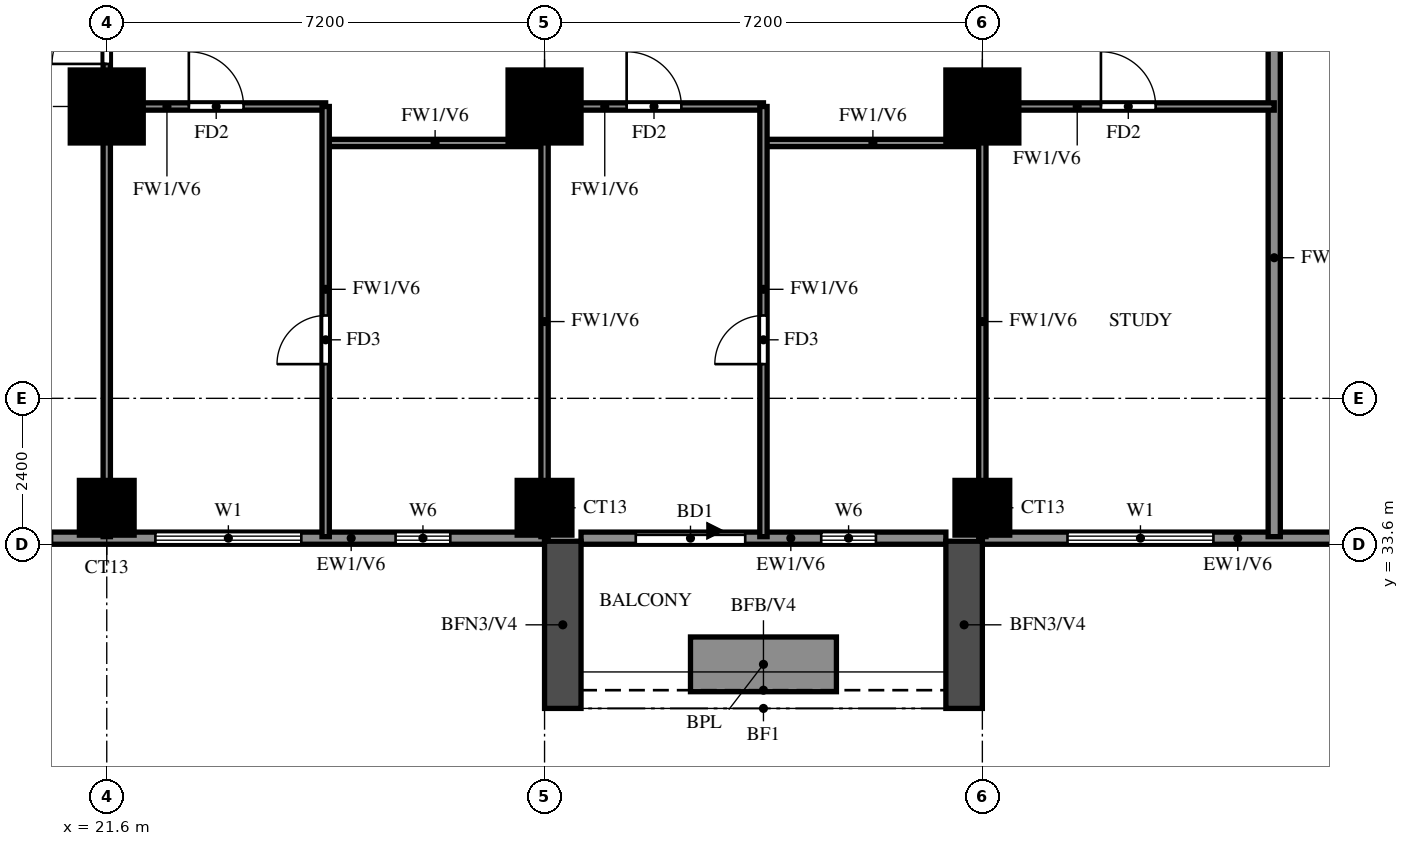
"""IFC4 building model, lengths in metres.
Left out: names, types, materials, properties, quantities, classifications, styles, units other than length and angle.
Written with IfcOpenShell. Run it as: python <this file> out.ifc"""

import sys

from ifc_helpers import new_model, si_unit, direction, frame, frame_2d, origin, origin_2d, place, context, subcontext, project, spatial, rectangle, extrude, source, transform, mapped, element, fill, save


model = new_model("IFC4")
c1 = context("Model", 3, precision=1e-05, world=origin(), true_north=direction((0.0, 1.0)))
c2 = subcontext(c1, "Body", "Model", "MODEL_VIEW")
j1 = project(units=[si_unit("LENGTHUNIT", "METRE"), si_unit("PLANEANGLEUNIT", "RADIAN")], contexts=[c1])
p1 = place(None, origin())
s1 = spatial("IfcSite", under=j1, at=p1, CompositionType="ELEMENT")
p2 = place(p1, origin())
s2 = spatial("IfcBuilding", under=s1, at=p2, CompositionType="ELEMENT")
p3 = place(p2, frame((0.0, 0.0, 104.0)))
s3 = spatial("IfcBuildingStorey", under=s2, at=p3, CompositionType="ELEMENT", Elevation=104.0)
m1 = source(origin(), c2, "Body", "SweptSolid", [
    extrude(rectangle(XDim=0.9, YDim=0.9, at=origin_2d()), origin(), (0.0, 0.0, 1.0), 3.1),
])
for number, where, z_axis, x_axis in (
    (1, (21.6, 34.2, 0.0), (0.0, 0.0, 1.0), (1.0, 0.0, 0.0)),
    (2, (28.8, 34.2, 0.0), (0.0, 0.0, 1.0), (1.0, 0.0, 0.0)),
    (3, (36.0, 34.2, 0.0), (0.0, 0.0, 1.0), (1.0, 0.0, 0.0)),
):
    element("IfcColumn", number, at=place(p3, frame(where, z_axis=z_axis, x_axis=x_axis)), inside=s3, PredefinedType="COLUMN", context=c2, shape_type="MappedRepresentation", body=[
        mapped(m1, transform((0.0, 0.0, 0.0))),
    ])
m2 = source(origin(), c2, "Body", "SweptSolid", [
    extrude(rectangle(XDim=1.2, YDim=1.2, at=origin_2d()), origin(), (0.0, 0.0, 1.0), 3.1),
])
for number, where, z_axis, x_axis in (
    (4, (21.6, 40.8, 0.0), (0.0, 0.0, 1.0), (1.0, 0.0, 0.0)),
    (5, (28.8, 40.8, 0.0), (0.0, 0.0, 1.0), (1.0, 0.0, 0.0)),
    (6, (36.0, 40.8, 0.0), (0.0, 0.0, 1.0), (1.0, 0.0, 0.0)),
):
    element("IfcColumn", number, at=place(p3, frame(where, z_axis=z_axis, x_axis=x_axis)), inside=s3, PredefinedType="COLUMN", context=c2, shape_type="MappedRepresentation", body=[
        mapped(m2, transform((0.0, 0.0, 0.0))),
    ])
p4 = place(p3, frame((18.2, 33.7, 0.0), z_axis=(0.0, 0.0, 1.0), x_axis=(1.0, 0.0, 0.0)))
e7 = element("IfcWall", 7, at=p4, inside=s3, PredefinedType="SOLIDWALL", context=c2, shape_type="SweptSolid", body=[
    extrude(rectangle(XDim=10.6, YDim=0.2, at=frame_2d((5.3, 0.0))), origin(), (0.0, 0.0, 1.0), 3.1),
])
p5 = place(p4, frame((0.7, 0.0, 0.6)))
e8 = element("IfcOpeningElement", 8, at=p5, cuts=e7, PredefinedType="OPENING", context=c2, shape_type="SweptSolid", body=[
    extrude(rectangle(XDim=1.8, YDim=2.4, at=frame_2d((0.9, 1.2))), frame((0.0, 0.11, 0.0), z_axis=(0.0, -1.0, 0.0), x_axis=(1.0, 0.0, 0.0)), (0.0, 0.0, 1.0), 0.22),
])
p6 = place(p4, frame((4.2, 0.0, 0.6)))
e9 = element("IfcOpeningElement", 9, at=p6, cuts=e7, PredefinedType="OPENING", context=c2, shape_type="SweptSolid", body=[
    extrude(rectangle(XDim=2.4, YDim=2.4, at=frame_2d((1.2, 1.2))), frame((0.0, 0.11, 0.0), z_axis=(0.0, -1.0, 0.0), x_axis=(1.0, 0.0, 0.0)), (0.0, 0.0, 1.0), 0.22),
])
p7 = place(p4, frame((8.15, 0.0, 1.5)))
e10 = element("IfcOpeningElement", 10, at=p7, cuts=e7, PredefinedType="OPENING", context=c2, shape_type="SweptSolid", body=[
    extrude(rectangle(XDim=0.9, YDim=0.9, at=frame_2d((0.45, 0.45))), frame((0.0, 0.11, 0.0), z_axis=(0.0, -1.0, 0.0), x_axis=(1.0, 0.0, 0.0)), (0.0, 0.0, 1.0), 0.22),
])
p8 = place(p3, frame((29.4, 33.7, 0.0), z_axis=(0.0, 0.0, 1.0), x_axis=(1.0, 0.0, 0.0)))
e11 = element("IfcWall", 11, at=p8, inside=s3, PredefinedType="SOLIDWALL", context=c2, shape_type="SweptSolid", body=[
    extrude(rectangle(XDim=6.0, YDim=0.2, at=frame_2d((3.0, 0.0))), origin(), (0.0, 0.0, 1.0), 3.1),
])
p9 = place(p8, frame((0.9, 0.0, 0.0)))
e12 = element("IfcOpeningElement", 12, at=p9, cuts=e11, PredefinedType="OPENING", context=c2, shape_type="SweptSolid", body=[
    extrude(rectangle(XDim=1.8, YDim=2.4, at=frame_2d((0.9, 1.2))), frame((0.0, 0.11, 0.0), z_axis=(0.0, -1.0, 0.0), x_axis=(1.0, 0.0, 0.0)), (0.0, 0.0, 1.0), 0.22),
])
p10 = place(p8, frame((3.95, 0.0, 1.5)))
e13 = element("IfcOpeningElement", 13, at=p10, cuts=e11, PredefinedType="OPENING", context=c2, shape_type="SweptSolid", body=[
    extrude(rectangle(XDim=0.9, YDim=0.9, at=frame_2d((0.45, 0.45))), frame((0.0, 0.11, 0.0), z_axis=(0.0, -1.0, 0.0), x_axis=(1.0, 0.0, 0.0)), (0.0, 0.0, 1.0), 0.22),
])
p11 = place(p3, frame((36.0, 33.7, 0.0), z_axis=(0.0, 0.0, 1.0), x_axis=(1.0, 0.0, 0.0)))
e14 = element("IfcWall", 14, at=p11, inside=s3, PredefinedType="SOLIDWALL", context=c2, shape_type="SweptSolid", body=[
    extrude(rectangle(XDim=6.0, YDim=0.2, at=frame_2d((3.0, 0.0))), origin(), (0.0, 0.0, 1.0), 3.1),
])
p12 = place(p11, frame((1.4, 0.0, 0.6)))
e15 = element("IfcOpeningElement", 15, at=p12, cuts=e14, PredefinedType="OPENING", context=c2, shape_type="SweptSolid", body=[
    extrude(rectangle(XDim=2.4, YDim=2.4, at=frame_2d((1.2, 1.2))), frame((0.0, 0.11, 0.0), z_axis=(0.0, -1.0, 0.0), x_axis=(1.0, 0.0, 0.0)), (0.0, 0.0, 1.0), 0.22),
])
for number, where, z_axis, x_axis in (
    (16, (29.1, 33.65, 0.0), (0.0, 0.0, 1.0), (0.0, -1.0, 0.0)),
    (17, (35.7, 33.65, 0.0), (0.0, 0.0, 1.0), (0.0, -1.0, 0.0)),
):
    element("IfcWall", number, at=place(p3, frame(where, z_axis=z_axis, x_axis=x_axis)), inside=s3, PredefinedType="SOLIDWALL", context=c2, shape_type="SweptSolid", body=[
        extrude(rectangle(XDim=2.75, YDim=0.6, at=frame_2d((1.375, 0.0))), origin(), (0.0, 0.0, 1.0), 2.77),
    ])
p13 = place(p3, frame((31.2, 31.625, 0.0), z_axis=(0.0, 0.0, 1.0), x_axis=(1.0, 0.0, 0.0)))
e18 = element("IfcWall", 18, at=p13, inside=s3, PredefinedType="SOLIDWALL", context=c2, shape_type="SweptSolid", body=[
    extrude(rectangle(XDim=2.4, YDim=0.9, at=frame_2d((1.2, 0.0))), origin(), (0.0, 0.0, 1.0), 0.9),
])
p14 = place(p3, frame((40.8, 33.725, 0.0), z_axis=(0.0, 0.0, 1.0), x_axis=(0.0, 1.0, 0.0)))
e19 = element("IfcWall", 19, at=p14, inside=s3, PredefinedType="SOLIDWALL", context=c2, shape_type="SweptSolid", body=[
    extrude(rectangle(XDim=9.175, YDim=0.2, at=frame_2d((4.587, 0.0))), origin(), (0.0, 0.0, 1.0), 3.1),
])
for number, where, z_axis, x_axis in (
    (20, (25.2, 40.2, 0.0), (0.0, 0.0, 1.0), (1.0, 0.0, 0.0)),
    (21, (32.4, 40.2, 0.0), (0.0, 0.0, 1.0), (1.0, 0.0, 0.0)),
):
    element("IfcWall", number, at=place(p3, frame(where, z_axis=z_axis, x_axis=x_axis)), inside=s3, PredefinedType="PARTITIONING", context=c2, shape_type="SweptSolid", body=[
        extrude(rectangle(XDim=3.6, YDim=0.12, at=frame_2d((1.8, 0.0))), origin(), (0.0, 0.0, 1.0), 3.1),
    ])
p15 = place(p3, frame((21.6, 40.8, 0.0), z_axis=(0.0, 0.0, 1.0), x_axis=(1.0, 0.0, 0.0)))
e22 = element("IfcWall", 22, at=p15, inside=s3, PredefinedType="PARTITIONING", context=c2, shape_type="SweptSolid", body=[
    extrude(rectangle(XDim=3.6, YDim=0.12, at=frame_2d((1.8, 0.0))), origin(), (0.0, 0.0, 1.0), 3.1),
])
p16 = place(p15, frame((1.35, 0.0, 0.0)))
e23 = element("IfcOpeningElement", 23, at=p16, cuts=e22, PredefinedType="OPENING", context=c2, shape_type="SweptSolid", body=[
    extrude(rectangle(XDim=0.9, YDim=2.1, at=frame_2d((0.45, 1.05))), frame((0.0, 0.07, 0.0), z_axis=(0.0, -1.0, 0.0), x_axis=(1.0, 0.0, 0.0)), (0.0, 0.0, 1.0), 0.14),
])
p17 = place(p3, frame((28.8, 40.8, 0.0), z_axis=(0.0, 0.0, 1.0), x_axis=(1.0, 0.0, 0.0)))
e24 = element("IfcWall", 24, at=p17, inside=s3, PredefinedType="PARTITIONING", context=c2, shape_type="SweptSolid", body=[
    extrude(rectangle(XDim=3.6, YDim=0.12, at=frame_2d((1.8, 0.0))), origin(), (0.0, 0.0, 1.0), 3.1),
])
p18 = place(p17, frame((1.35, 0.0, 0.0)))
e25 = element("IfcOpeningElement", 25, at=p18, cuts=e24, PredefinedType="OPENING", context=c2, shape_type="SweptSolid", body=[
    extrude(rectangle(XDim=0.9, YDim=2.1, at=frame_2d((0.45, 1.05))), frame((0.0, 0.07, 0.0), z_axis=(0.0, -1.0, 0.0), x_axis=(1.0, 0.0, 0.0)), (0.0, 0.0, 1.0), 0.14),
])
p19 = place(p3, frame((36.0, 40.8, 0.0), z_axis=(0.0, 0.0, 1.0), x_axis=(1.0, 0.0, 0.0)))
e26 = element("IfcWall", 26, at=p19, inside=s3, PredefinedType="PARTITIONING", context=c2, shape_type="SweptSolid", body=[
    extrude(rectangle(XDim=4.8, YDim=0.12, at=frame_2d((2.4, 0.0))), origin(), (0.0, 0.0, 1.0), 3.1),
])
p20 = place(p19, frame((1.95, 0.0, 0.0)))
e27 = element("IfcOpeningElement", 27, at=p20, cuts=e26, PredefinedType="OPENING", context=c2, shape_type="SweptSolid", body=[
    extrude(rectangle(XDim=0.9, YDim=2.1, at=frame_2d((0.45, 1.05))), frame((0.0, 0.07, 0.0), z_axis=(0.0, -1.0, 0.0), x_axis=(1.0, 0.0, 0.0)), (0.0, 0.0, 1.0), 0.14),
])
p21 = place(p3, frame((21.6, 33.725, 0.0), z_axis=(0.0, 0.0, 1.0), x_axis=(0.0, 1.0, 0.0)))
e28 = element("IfcWall", 28, at=p21, inside=s3, PredefinedType="PARTITIONING", context=c2, shape_type="SweptSolid", body=[
    extrude(rectangle(XDim=17.875, YDim=0.12, at=frame_2d((8.938, 0.0))), origin(), (0.0, 0.0, 1.0), 3.1),
])
p22 = place(p21, frame((7.775, 0.0, 0.0)))
e29 = element("IfcOpeningElement", 29, at=p22, cuts=e28, PredefinedType="OPENING", context=c2, shape_type="SweptSolid", body=[
    extrude(rectangle(XDim=0.9, YDim=2.1, at=frame_2d((0.45, 1.05))), frame((0.0, 0.07, 0.0), z_axis=(0.0, -1.0, 0.0), x_axis=(1.0, 0.0, 0.0)), (0.0, 0.0, 1.0), 0.14),
])
p23 = place(p21, frame((15.625, 0.0, 0.0)))
e30 = element("IfcOpeningElement", 30, at=p23, cuts=e28, PredefinedType="OPENING", context=c2, shape_type="SweptSolid", body=[
    extrude(rectangle(XDim=0.9, YDim=2.1, at=frame_2d((0.45, 1.05))), frame((0.0, 0.07, 0.0), z_axis=(0.0, -1.0, 0.0), x_axis=(1.0, 0.0, 0.0)), (0.0, 0.0, 1.0), 0.14),
])
p24 = place(p3, frame((25.2, 33.725, 0.0), z_axis=(0.0, 0.0, 1.0), x_axis=(0.0, 1.0, 0.0)))
e31 = element("IfcWall", 31, at=p24, inside=s3, PredefinedType="PARTITIONING", context=c2, shape_type="SweptSolid", body=[
    extrude(rectangle(XDim=7.075, YDim=0.12, at=frame_2d((3.538, 0.0))), origin(), (0.0, 0.0, 1.0), 3.1),
])
p25 = place(p24, frame((2.837, 0.0, 0.0)))
e32 = element("IfcOpeningElement", 32, at=p25, cuts=e31, PredefinedType="OPENING", context=c2, shape_type="SweptSolid", body=[
    extrude(rectangle(XDim=0.8, YDim=2.1, at=frame_2d((0.4, 1.05))), frame((0.0, 0.07, 0.0), z_axis=(0.0, -1.0, 0.0), x_axis=(1.0, 0.0, 0.0)), (0.0, 0.0, 1.0), 0.14),
])
p26 = place(p3, frame((28.8, 33.725, 0.0), z_axis=(0.0, 0.0, 1.0), x_axis=(0.0, 1.0, 0.0)))
e33 = element("IfcWall", 33, at=p26, inside=s3, PredefinedType="PARTITIONING", context=c2, shape_type="SweptSolid", body=[
    extrude(rectangle(XDim=7.075, YDim=0.12, at=frame_2d((3.538, 0.0))), origin(), (0.0, 0.0, 1.0), 3.1),
])
p27 = place(p3, frame((32.4, 33.725, 0.0), z_axis=(0.0, 0.0, 1.0), x_axis=(0.0, 1.0, 0.0)))
e34 = element("IfcWall", 34, at=p27, inside=s3, PredefinedType="PARTITIONING", context=c2, shape_type="SweptSolid", body=[
    extrude(rectangle(XDim=7.075, YDim=0.12, at=frame_2d((3.538, 0.0))), origin(), (0.0, 0.0, 1.0), 3.1),
])
p28 = place(p27, frame((2.837, 0.0, 0.0)))
e35 = element("IfcOpeningElement", 35, at=p28, cuts=e34, PredefinedType="OPENING", context=c2, shape_type="SweptSolid", body=[
    extrude(rectangle(XDim=0.8, YDim=2.1, at=frame_2d((0.4, 1.05))), frame((0.0, 0.07, 0.0), z_axis=(0.0, -1.0, 0.0), x_axis=(1.0, 0.0, 0.0)), (0.0, 0.0, 1.0), 0.14),
])
p29 = place(p3, frame((36.0, 33.725, 0.0), z_axis=(0.0, 0.0, 1.0), x_axis=(0.0, 1.0, 0.0)))
e36 = element("IfcWall", 36, at=p29, inside=s3, PredefinedType="PARTITIONING", context=c2, shape_type="SweptSolid", body=[
    extrude(rectangle(XDim=7.075, YDim=0.12, at=frame_2d((3.538, 0.0))), origin(), (0.0, 0.0, 1.0), 3.1),
])
p30 = place(p6, origin())
e37 = element("IfcWindow", 37, at=p30, inside=s3, PartitioningType="DOUBLE_PANEL_VERTICAL", PredefinedType="WINDOW", context=c2, shape_type="SweptSolid", body=[
    extrude(rectangle(XDim=2.4, YDim=2.4, at=frame_2d((1.2, 1.2))), frame((0.0, 0.03, 0.0), z_axis=(0.0, -1.0, 0.0), x_axis=(1.0, 0.0, 0.0)), (0.0, 0.0, 1.0), 0.06),
])
fill(e9, e37)
p31 = place(p7, origin())
e38 = element("IfcWindow", 38, at=p31, inside=s3, PartitioningType="SINGLE_PANEL", PredefinedType="WINDOW", context=c2, shape_type="SweptSolid", body=[
    extrude(rectangle(XDim=0.9, YDim=0.9, at=frame_2d((0.45, 0.45))), frame((0.0, 0.03, 0.0), z_axis=(0.0, -1.0, 0.0), x_axis=(1.0, 0.0, 0.0)), (0.0, 0.0, 1.0), 0.06),
])
fill(e10, e38)
p32 = place(p9, origin())
e39 = element("IfcDoor", 39, at=p32, inside=s3, OperationType="DOUBLE_DOOR_SLIDING", PredefinedType="DOOR", context=c2, shape_type="SweptSolid", body=[
    extrude(rectangle(XDim=1.8, YDim=2.4, at=frame_2d((0.9, 1.2))), frame((0.0, 0.025, 0.0), z_axis=(0.0, -1.0, 0.0), x_axis=(1.0, 0.0, 0.0)), (0.0, 0.0, 1.0), 0.05),
])
fill(e12, e39)
p33 = place(p10, origin())
e40 = element("IfcWindow", 40, at=p33, inside=s3, PartitioningType="SINGLE_PANEL", PredefinedType="WINDOW", context=c2, shape_type="SweptSolid", body=[
    extrude(rectangle(XDim=0.9, YDim=0.9, at=frame_2d((0.45, 0.45))), frame((0.0, 0.03, 0.0), z_axis=(0.0, -1.0, 0.0), x_axis=(1.0, 0.0, 0.0)), (0.0, 0.0, 1.0), 0.06),
])
fill(e13, e40)
p34 = place(p12, origin())
e41 = element("IfcWindow", 41, at=p34, inside=s3, PartitioningType="DOUBLE_PANEL_VERTICAL", PredefinedType="WINDOW", context=c2, shape_type="SweptSolid", body=[
    extrude(rectangle(XDim=2.4, YDim=2.4, at=frame_2d((1.2, 1.2))), frame((0.0, 0.03, 0.0), z_axis=(0.0, -1.0, 0.0), x_axis=(1.0, 0.0, 0.0)), (0.0, 0.0, 1.0), 0.06),
])
fill(e15, e41)
p35 = place(p22, origin())
e42 = element("IfcDoor", 42, at=p35, inside=s3, OperationType="SINGLE_SWING_RIGHT", PredefinedType="DOOR", context=c2, shape_type="SweptSolid", body=[
    extrude(rectangle(XDim=0.9, YDim=2.1, at=frame_2d((0.45, 1.05))), frame((0.0, 0.025, 0.0), z_axis=(0.0, -1.0, 0.0), x_axis=(1.0, 0.0, 0.0)), (0.0, 0.0, 1.0), 0.05),
])
fill(e29, e42)
p36 = place(p16, origin())
e43 = element("IfcDoor", 43, at=p36, inside=s3, OperationType="SINGLE_SWING_LEFT", PredefinedType="DOOR", context=c2, shape_type="SweptSolid", body=[
    extrude(rectangle(XDim=0.9, YDim=2.1, at=frame_2d((0.45, 1.05))), frame((0.0, 0.025, 0.0), z_axis=(0.0, -1.0, 0.0), x_axis=(1.0, 0.0, 0.0)), (0.0, 0.0, 1.0), 0.05),
])
fill(e23, e43)
p37 = place(p25, origin())
e44 = element("IfcDoor", 44, at=p37, inside=s3, OperationType="SINGLE_SWING_RIGHT", PredefinedType="DOOR", context=c2, shape_type="SweptSolid", body=[
    extrude(rectangle(XDim=0.8, YDim=2.1, at=frame_2d((0.4, 1.05))), frame((0.0, 0.025, 0.0), z_axis=(0.0, -1.0, 0.0), x_axis=(1.0, 0.0, 0.0)), (0.0, 0.0, 1.0), 0.05),
])
fill(e32, e44)
p38 = place(p18, origin())
e45 = element("IfcDoor", 45, at=p38, inside=s3, OperationType="SINGLE_SWING_LEFT", PredefinedType="DOOR", context=c2, shape_type="SweptSolid", body=[
    extrude(rectangle(XDim=0.9, YDim=2.1, at=frame_2d((0.45, 1.05))), frame((0.0, 0.025, 0.0), z_axis=(0.0, -1.0, 0.0), x_axis=(1.0, 0.0, 0.0)), (0.0, 0.0, 1.0), 0.05),
])
fill(e25, e45)
p39 = place(p28, origin())
e46 = element("IfcDoor", 46, at=p39, inside=s3, OperationType="SINGLE_SWING_LEFT", PredefinedType="DOOR", context=c2, shape_type="SweptSolid", body=[
    extrude(rectangle(XDim=0.8, YDim=2.1, at=frame_2d((0.4, 1.05))), frame((0.0, 0.025, 0.0), z_axis=(0.0, -1.0, 0.0), x_axis=(1.0, 0.0, 0.0)), (0.0, 0.0, 1.0), 0.05),
])
fill(e35, e46)
p40 = place(p20, origin())
e47 = element("IfcDoor", 47, at=p40, inside=s3, OperationType="SINGLE_SWING_RIGHT", PredefinedType="DOOR", context=c2, shape_type="SweptSolid", body=[
    extrude(rectangle(XDim=0.9, YDim=2.1, at=frame_2d((0.45, 1.05))), frame((0.0, 0.025, 0.0), z_axis=(0.0, -1.0, 0.0), x_axis=(1.0, 0.0, 0.0)), (0.0, 0.0, 1.0), 0.05),
])
fill(e27, e47)
save(model, sys.argv[1])
